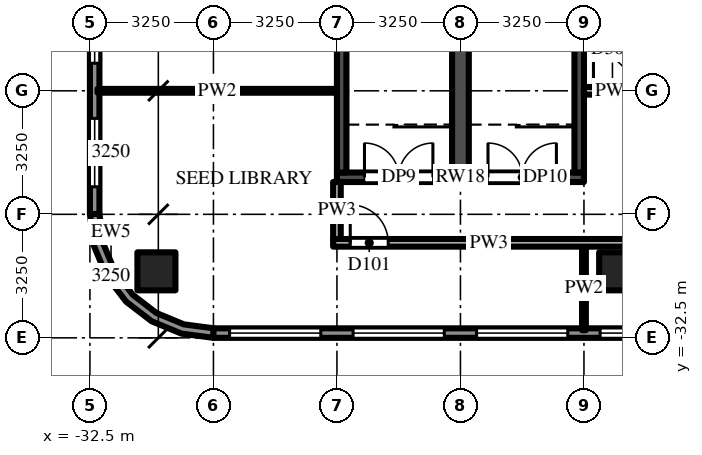
"""IFC4 building model, lengths in metres.
Left out: names, types, materials, properties, quantities, classifications, styles, units other than length and angle.
Written with IfcOpenShell. Run it as: python <this file> out.ifc"""

import sys

from ifc_helpers import new_model, si_unit, direction, frame, frame_2d, origin, origin_2d, place, context, subcontext, project, spatial, polyline, rectangle, outline, extrude, source, transform, mapped, element, fill, save


model = new_model("IFC4")
c1 = context("Model", 3, precision=1e-05, world=origin(), true_north=direction((0.0, 1.0)))
c2 = subcontext(c1, "Body", "Model", "MODEL_VIEW")
j1 = project(units=[si_unit("LENGTHUNIT", "METRE"), si_unit("PLANEANGLEUNIT", "RADIAN")], contexts=[c1])
p1 = place(None, origin())
s1 = spatial("IfcSite", under=j1, at=p1, CompositionType="ELEMENT")
p2 = place(p1, origin())
s2 = spatial("IfcBuilding", under=s1, at=p2, CompositionType="ELEMENT")
p3 = place(p2, frame((0.0, 0.0, 29.0)))
s3 = spatial("IfcBuildingStorey", under=s2, at=p3, CompositionType="ELEMENT", Elevation=29.0)
m1 = source(origin(), c2, "Body", "SweptSolid", [
    extrude(rectangle(XDim=1.0, YDim=1.0, at=origin_2d()), origin(), (0.0, 0.0, 1.0), 5.0),
])
for number, where, z_axis, x_axis in (
    (1, (-18.6, -30.75, 0.0), (0.0, 0.0, 1.0), (1.0, 0.0, 0.0)),
    (2, (-30.75, -30.75, 0.0), (0.0, 0.0, 1.0), (1.0, 0.0, 0.0)),
):
    element("IfcColumn", number, at=place(p3, frame(where, z_axis=z_axis, x_axis=x_axis)), inside=s3, PredefinedType="COLUMN", context=c2, shape_type="MappedRepresentation", body=[
        mapped(m1, transform((0.0, 0.0, 0.0))),
    ])
m2 = source(origin(), c2, "Body", "SweptSolid", [
    extrude(rectangle(XDim=6.5, YDim=0.25, at=frame_2d((3.25, 0.0))), origin(), (0.0, 0.0, 1.0), 4.65),
])
p4 = place(p3, frame((-26.0, -28.275, 0.0), z_axis=(0.0, 0.0, 1.0), x_axis=(1.0, 0.0, 0.0)))
e3 = element("IfcWall", 3, at=p4, inside=s3, PredefinedType="SHEAR", context=c2, shape_type="MappedRepresentation", body=[
    mapped(m2, transform((0.0, 0.0, 0.0))),
])
m3 = source(origin(), c2, "Body", "SweptSolid", [
    extrude(rectangle(XDim=1.8, YDim=2.1, at=frame_2d((0.9, 1.05))), frame((0.0, 0.135, 0.0), z_axis=(0.0, -1.0, 0.0), x_axis=(1.0, 0.0, 0.0)), (0.0, 0.0, 1.0), 0.27),
])
p5 = place(p4, frame((0.725, 0.0, 0.0)))
e4 = element("IfcOpeningElement", 4, at=p5, cuts=e3, PredefinedType="OPENING", context=c2, shape_type="MappedRepresentation", body=[
    mapped(m3, transform((0.0, 0.0, 0.0))),
])
p6 = place(p4, frame((3.975, 0.0, 0.0)))
e5 = element("IfcOpeningElement", 5, at=p6, cuts=e3, PredefinedType="OPENING", context=c2, shape_type="MappedRepresentation", body=[
    mapped(m3, transform((0.0, 0.0, 0.0))),
])
m4 = source(origin(), c2, "Body", "SweptSolid", [
    extrude(rectangle(XDim=8.3, YDim=0.25, at=frame_2d((4.15, 0.0))), origin(), (0.0, 0.0, 1.0), 4.65),
])
for number, where, z_axis, x_axis in (
    (6, (-25.875, -28.15, 0.0), (0.0, 0.0, 1.0), (0.0, 1.0, 0.0)),
    (7, (-19.625, -28.15, 0.0), (0.0, 0.0, 1.0), (0.0, 1.0, 0.0)),
):
    element("IfcWall", number, at=place(p3, frame(where, z_axis=z_axis, x_axis=x_axis)), inside=s3, PredefinedType="SHEAR", context=c2, shape_type="MappedRepresentation", body=[
        mapped(m4, transform((0.0, 0.0, 0.0))),
    ])
m5 = source(origin(), c2, "Body", "SweptSolid", [
    extrude(rectangle(XDim=8.3, YDim=0.44, at=frame_2d((4.15, 0.0))), origin(), (0.0, 0.0, 1.0), 4.65),
])
p7 = place(p3, frame((-22.75, -28.15, 0.0), z_axis=(0.0, 0.0, 1.0), x_axis=(0.0, 1.0, 0.0)))
e8 = element("IfcWall", 8, at=p7, inside=s3, PredefinedType="SHEAR", context=c2, shape_type="MappedRepresentation", body=[
    mapped(m5, transform((0.0, 0.0, 0.0))),
])
m6 = source(origin(), c2, "Body", "SweptSolid", [
    extrude(rectangle(XDim=58.5, YDim=0.25, at=frame_2d((29.25, 0.0))), origin(), (0.0, 0.0, 1.0), 4.65),
])
p8 = place(p3, frame((-32.375, 29.25, 0.0), z_axis=(0.0, 0.0, 1.0), x_axis=(0.0, -1.0, 0.0)))
e9 = element("IfcWall", 9, at=p8, inside=s3, PredefinedType="SOLIDWALL", context=c2, shape_type="MappedRepresentation", body=[
    mapped(m6, transform((0.0, 0.0, 0.0))),
])
m7 = source(origin(), c2, "Body", "SweptSolid", [
    extrude(rectangle(XDim=1.8, YDim=3.3, at=frame_2d((0.9, 1.65))), frame((0.0, 0.135, 0.0), z_axis=(0.0, -1.0, 0.0), x_axis=(1.0, 0.0, 0.0)), (0.0, 0.0, 1.0), 0.27),
])
p9 = place(p8, frame((0.725, 0.0, 0.6)))
e10 = element("IfcOpeningElement", 10, at=p9, cuts=e9, PredefinedType="OPENING", context=c2, shape_type="MappedRepresentation", body=[
    mapped(m7, transform((0.0, 0.0, 0.0))),
])
p10 = place(p8, frame((3.975, 0.0, 0.6)))
e11 = element("IfcOpeningElement", 11, at=p10, cuts=e9, PredefinedType="OPENING", context=c2, shape_type="MappedRepresentation", body=[
    mapped(m7, transform((0.0, 0.0, 0.0))),
])
p11 = place(p8, frame((7.225, 0.0, 0.6)))
e12 = element("IfcOpeningElement", 12, at=p11, cuts=e9, PredefinedType="OPENING", context=c2, shape_type="MappedRepresentation", body=[
    mapped(m7, transform((0.0, 0.0, 0.0))),
])
p12 = place(p8, frame((10.475, 0.0, 0.6)))
e13 = element("IfcOpeningElement", 13, at=p12, cuts=e9, PredefinedType="OPENING", context=c2, shape_type="MappedRepresentation", body=[
    mapped(m7, transform((0.0, 0.0, 0.0))),
])
p13 = place(p8, frame((13.725, 0.0, 0.6)))
e14 = element("IfcOpeningElement", 14, at=p13, cuts=e9, PredefinedType="OPENING", context=c2, shape_type="MappedRepresentation", body=[
    mapped(m7, transform((0.0, 0.0, 0.0))),
])
p14 = place(p8, frame((16.975, 0.0, 0.6)))
e15 = element("IfcOpeningElement", 15, at=p14, cuts=e9, PredefinedType="OPENING", context=c2, shape_type="MappedRepresentation", body=[
    mapped(m7, transform((0.0, 0.0, 0.0))),
])
p15 = place(p8, frame((20.225, 0.0, 0.6)))
e16 = element("IfcOpeningElement", 16, at=p15, cuts=e9, PredefinedType="OPENING", context=c2, shape_type="MappedRepresentation", body=[
    mapped(m7, transform((0.0, 0.0, 0.0))),
])
p16 = place(p8, frame((23.475, 0.0, 0.6)))
e17 = element("IfcOpeningElement", 17, at=p16, cuts=e9, PredefinedType="OPENING", context=c2, shape_type="MappedRepresentation", body=[
    mapped(m7, transform((0.0, 0.0, 0.0))),
])
p17 = place(p8, frame((26.725, 0.0, 0.6)))
e18 = element("IfcOpeningElement", 18, at=p17, cuts=e9, PredefinedType="OPENING", context=c2, shape_type="MappedRepresentation", body=[
    mapped(m7, transform((0.0, 0.0, 0.0))),
])
p18 = place(p8, frame((29.975, 0.0, 0.6)))
e19 = element("IfcOpeningElement", 19, at=p18, cuts=e9, PredefinedType="OPENING", context=c2, shape_type="MappedRepresentation", body=[
    mapped(m7, transform((0.0, 0.0, 0.0))),
])
p19 = place(p8, frame((33.225, 0.0, 0.6)))
e20 = element("IfcOpeningElement", 20, at=p19, cuts=e9, PredefinedType="OPENING", context=c2, shape_type="MappedRepresentation", body=[
    mapped(m7, transform((0.0, 0.0, 0.0))),
])
p20 = place(p8, frame((36.475, 0.0, 0.6)))
e21 = element("IfcOpeningElement", 21, at=p20, cuts=e9, PredefinedType="OPENING", context=c2, shape_type="MappedRepresentation", body=[
    mapped(m7, transform((0.0, 0.0, 0.0))),
])
p21 = place(p8, frame((39.725, 0.0, 0.6)))
e22 = element("IfcOpeningElement", 22, at=p21, cuts=e9, PredefinedType="OPENING", context=c2, shape_type="MappedRepresentation", body=[
    mapped(m7, transform((0.0, 0.0, 0.0))),
])
p22 = place(p8, frame((42.975, 0.0, 0.6)))
e23 = element("IfcOpeningElement", 23, at=p22, cuts=e9, PredefinedType="OPENING", context=c2, shape_type="MappedRepresentation", body=[
    mapped(m7, transform((0.0, 0.0, 0.0))),
])
p23 = place(p8, frame((46.225, 0.0, 0.6)))
e24 = element("IfcOpeningElement", 24, at=p23, cuts=e9, PredefinedType="OPENING", context=c2, shape_type="MappedRepresentation", body=[
    mapped(m7, transform((0.0, 0.0, 0.0))),
])
p24 = place(p8, frame((49.475, 0.0, 0.6)))
e25 = element("IfcOpeningElement", 25, at=p24, cuts=e9, PredefinedType="OPENING", context=c2, shape_type="MappedRepresentation", body=[
    mapped(m7, transform((0.0, 0.0, 0.0))),
])
p25 = place(p8, frame((52.725, 0.0, 0.6)))
e26 = element("IfcOpeningElement", 26, at=p25, cuts=e9, PredefinedType="OPENING", context=c2, shape_type="MappedRepresentation", body=[
    mapped(m7, transform((0.0, 0.0, 0.0))),
])
p26 = place(p8, frame((55.975, 0.0, 0.6)))
e27 = element("IfcOpeningElement", 27, at=p26, cuts=e9, PredefinedType="OPENING", context=c2, shape_type="MappedRepresentation", body=[
    mapped(m7, transform((0.0, 0.0, 0.0))),
])
p27 = place(p3, origin())
e28 = element("IfcWall", 28, at=p27, inside=s3, PredefinedType="SOLIDWALL", context=c2, shape_type="SweptSolid", body=[
    extrude(outline(polyline([(-32.5, -29.25), (-32.389, -30.091), (-32.065, -30.875), (-31.548, -31.548), (-30.875, -32.065), (-30.091, -32.389), (-29.25, -32.5), (-29.234, -32.25), (-30.026, -32.146), (-30.749, -31.846), (-31.37, -31.37), (-31.846, -30.749), (-32.146, -30.026), (-32.25, -29.234), (-32.5, -29.25)])), origin(), (0.0, 0.0, 1.0), 4.65),
])
p28 = place(p3, frame((-29.25, -32.375, 0.0), z_axis=(0.0, 0.0, 1.0), x_axis=(1.0, 0.0, 0.0)))
e29 = element("IfcWall", 29, at=p28, inside=s3, PredefinedType="SOLIDWALL", context=c2, shape_type="MappedRepresentation", body=[
    mapped(m6, transform((0.0, 0.0, 0.0))),
])
m8 = source(origin(), c2, "Body", "SweptSolid", [
    extrude(rectangle(XDim=2.4, YDim=3.3, at=frame_2d((1.2, 1.65))), frame((0.0, 0.135, 0.0), z_axis=(0.0, -1.0, 0.0), x_axis=(1.0, 0.0, 0.0)), (0.0, 0.0, 1.0), 0.27),
])
p29 = place(p28, frame((0.425, 0.0, 0.6)))
e30 = element("IfcOpeningElement", 30, at=p29, cuts=e29, PredefinedType="OPENING", context=c2, shape_type="MappedRepresentation", body=[
    mapped(m8, transform((0.0, 0.0, 0.0))),
])
p30 = place(p28, frame((3.675, 0.0, 0.6)))
e31 = element("IfcOpeningElement", 31, at=p30, cuts=e29, PredefinedType="OPENING", context=c2, shape_type="MappedRepresentation", body=[
    mapped(m8, transform((0.0, 0.0, 0.0))),
])
p31 = place(p28, frame((6.925, 0.0, 0.6)))
e32 = element("IfcOpeningElement", 32, at=p31, cuts=e29, PredefinedType="OPENING", context=c2, shape_type="MappedRepresentation", body=[
    mapped(m8, transform((0.0, 0.0, 0.0))),
])
p32 = place(p28, frame((10.175, 0.0, 0.6)))
e33 = element("IfcOpeningElement", 33, at=p32, cuts=e29, PredefinedType="OPENING", context=c2, shape_type="MappedRepresentation", body=[
    mapped(m8, transform((0.0, 0.0, 0.0))),
])
p33 = place(p28, frame((13.425, 0.0, 0.6)))
e34 = element("IfcOpeningElement", 34, at=p33, cuts=e29, PredefinedType="OPENING", context=c2, shape_type="MappedRepresentation", body=[
    mapped(m8, transform((0.0, 0.0, 0.0))),
])
p34 = place(p28, frame((16.675, 0.0, 0.6)))
e35 = element("IfcOpeningElement", 35, at=p34, cuts=e29, PredefinedType="OPENING", context=c2, shape_type="MappedRepresentation", body=[
    mapped(m8, transform((0.0, 0.0, 0.0))),
])
p35 = place(p28, frame((19.925, 0.0, 0.6)))
e36 = element("IfcOpeningElement", 36, at=p35, cuts=e29, PredefinedType="OPENING", context=c2, shape_type="MappedRepresentation", body=[
    mapped(m8, transform((0.0, 0.0, 0.0))),
])
p36 = place(p28, frame((23.175, 0.0, 0.6)))
e37 = element("IfcOpeningElement", 37, at=p36, cuts=e29, PredefinedType="OPENING", context=c2, shape_type="MappedRepresentation", body=[
    mapped(m8, transform((0.0, 0.0, 0.0))),
])
p37 = place(p28, frame((26.425, 0.0, 0.6)))
e38 = element("IfcOpeningElement", 38, at=p37, cuts=e29, PredefinedType="OPENING", context=c2, shape_type="MappedRepresentation", body=[
    mapped(m8, transform((0.0, 0.0, 0.0))),
])
p38 = place(p28, frame((29.675, 0.0, 0.6)))
e39 = element("IfcOpeningElement", 39, at=p38, cuts=e29, PredefinedType="OPENING", context=c2, shape_type="MappedRepresentation", body=[
    mapped(m8, transform((0.0, 0.0, 0.0))),
])
p39 = place(p28, frame((32.925, 0.0, 0.6)))
e40 = element("IfcOpeningElement", 40, at=p39, cuts=e29, PredefinedType="OPENING", context=c2, shape_type="MappedRepresentation", body=[
    mapped(m8, transform((0.0, 0.0, 0.0))),
])
p40 = place(p28, frame((36.175, 0.0, 0.6)))
e41 = element("IfcOpeningElement", 41, at=p40, cuts=e29, PredefinedType="OPENING", context=c2, shape_type="MappedRepresentation", body=[
    mapped(m8, transform((0.0, 0.0, 0.0))),
])
p41 = place(p28, frame((39.425, 0.0, 0.6)))
e42 = element("IfcOpeningElement", 42, at=p41, cuts=e29, PredefinedType="OPENING", context=c2, shape_type="MappedRepresentation", body=[
    mapped(m8, transform((0.0, 0.0, 0.0))),
])
p42 = place(p28, frame((42.675, 0.0, 0.6)))
e43 = element("IfcOpeningElement", 43, at=p42, cuts=e29, PredefinedType="OPENING", context=c2, shape_type="MappedRepresentation", body=[
    mapped(m8, transform((0.0, 0.0, 0.0))),
])
p43 = place(p28, frame((45.925, 0.0, 0.6)))
e44 = element("IfcOpeningElement", 44, at=p43, cuts=e29, PredefinedType="OPENING", context=c2, shape_type="MappedRepresentation", body=[
    mapped(m8, transform((0.0, 0.0, 0.0))),
])
p44 = place(p28, frame((49.175, 0.0, 0.6)))
e45 = element("IfcOpeningElement", 45, at=p44, cuts=e29, PredefinedType="OPENING", context=c2, shape_type="MappedRepresentation", body=[
    mapped(m8, transform((0.0, 0.0, 0.0))),
])
p45 = place(p28, frame((52.425, 0.0, 0.6)))
e46 = element("IfcOpeningElement", 46, at=p45, cuts=e29, PredefinedType="OPENING", context=c2, shape_type="MappedRepresentation", body=[
    mapped(m8, transform((0.0, 0.0, 0.0))),
])
p46 = place(p28, frame((55.675, 0.0, 0.6)))
e47 = element("IfcOpeningElement", 47, at=p46, cuts=e29, PredefinedType="OPENING", context=c2, shape_type="MappedRepresentation", body=[
    mapped(m8, transform((0.0, 0.0, 0.0))),
])
m9 = source(origin(), c2, "Body", "SweptSolid", [
    extrude(rectangle(XDim=1.5, YDim=0.2, at=frame_2d((0.75, 0.0))), origin(), (0.0, 0.0, 1.0), 4.65),
])
p47 = place(p3, frame((-26.0, -29.9, 0.0), z_axis=(0.0, 0.0, 1.0), x_axis=(0.0, 1.0, 0.0)))
e48 = element("IfcWall", 48, at=p47, inside=s3, PredefinedType="PARTITIONING", context=c2, shape_type="MappedRepresentation", body=[
    mapped(m9, transform((0.0, 0.0, 0.0))),
])
m10 = source(origin(), c2, "Body", "SweptSolid", [
    extrude(rectangle(XDim=2.2, YDim=0.1, at=frame_2d((1.1, 0.0))), origin(), (0.0, 0.0, 1.0), 3.73),
])
p48 = place(p3, frame((-19.5, -32.3, 0.0), z_axis=(0.0, 0.0, 1.0), x_axis=(0.0, 1.0, 0.0)))
e49 = element("IfcWall", 49, at=p48, inside=s3, PredefinedType="PARTITIONING", context=c2, shape_type="MappedRepresentation", body=[
    mapped(m10, transform((0.0, 0.0, 0.0))),
])
m11 = source(origin(), c2, "Body", "SweptSolid", [
    extrude(rectangle(XDim=8.2, YDim=0.2, at=frame_2d((4.1, 0.0))), origin(), (0.0, 0.0, 1.0), 3.712),
])
p49 = place(p3, frame((-26.1, -30.0, 0.0), z_axis=(0.0, 0.0, 1.0), x_axis=(1.0, 0.0, 0.0)))
e50 = element("IfcWall", 50, at=p49, inside=s3, PredefinedType="PARTITIONING", context=c2, shape_type="MappedRepresentation", body=[
    mapped(m11, transform((0.0, 0.0, 0.0))),
])
m12 = source(origin(), c2, "Body", "SweptSolid", [
    extrude(rectangle(XDim=1.0, YDim=2.1, at=frame_2d((0.5, 1.05))), frame((0.0, 0.11, 0.0), z_axis=(0.0, -1.0, 0.0), x_axis=(1.0, 0.0, 0.0)), (0.0, 0.0, 1.0), 0.22),
])
p50 = place(p49, frame((0.45, 0.0, 0.0)))
e51 = element("IfcOpeningElement", 51, at=p50, cuts=e50, PredefinedType="OPENING", context=c2, shape_type="MappedRepresentation", body=[
    mapped(m12, transform((0.0, 0.0, 0.0))),
])
m13 = source(origin(), c2, "Body", "SweptSolid", [
    extrude(rectangle(XDim=1.6, YDim=0.2, at=frame_2d((0.8, 0.0))), origin(), (0.0, 0.0, 1.0), 3.712),
])
p51 = place(p3, frame((-19.5, -26.0, 0.0), z_axis=(0.0, 0.0, 1.0), x_axis=(1.0, 0.0, 0.0)))
e52 = element("IfcWall", 52, at=p51, inside=s3, PredefinedType="PARTITIONING", context=c2, shape_type="MappedRepresentation", body=[
    mapped(m13, transform((0.0, 0.0, 0.0))),
])
p52 = place(p51, frame((0.25, 0.0, 0.0)))
e53 = element("IfcOpeningElement", 53, at=p52, cuts=e52, PredefinedType="OPENING", context=c2, shape_type="MappedRepresentation", body=[
    mapped(m12, transform((0.0, 0.0, 0.0))),
])
m14 = source(origin(), c2, "Body", "SweptSolid", [
    extrude(rectangle(XDim=6.3, YDim=0.1, at=frame_2d((3.15, 0.0))), origin(), (0.0, 0.0, 1.0), 3.73),
])
p53 = place(p3, frame((-32.3, -26.0, 0.0), z_axis=(0.0, 0.0, 1.0), x_axis=(1.0, 0.0, 0.0)))
e54 = element("IfcWall", 54, at=p53, inside=s3, PredefinedType="PARTITIONING", context=c2, shape_type="MappedRepresentation", body=[
    mapped(m14, transform((0.0, 0.0, 0.0))),
])
m15 = source(origin(), c2, "Body", "SweptSolid", [
    extrude(rectangle(XDim=1.8, YDim=2.1, at=frame_2d((0.9, 1.05))), frame((0.0, 0.025, 0.0), z_axis=(0.0, -1.0, 0.0), x_axis=(1.0, 0.0, 0.0)), (0.0, 0.0, 1.0), 0.05),
])
p54 = place(p5, origin())
e55 = element("IfcDoor", 55, at=p54, inside=s3, OperationType="DOUBLE_DOOR_SINGLE_SWING", PredefinedType="DOOR", context=c2, shape_type="MappedRepresentation", body=[
    mapped(m15, transform((0.0, 0.0, 0.0))),
])
fill(e4, e55)
p55 = place(p6, origin())
e56 = element("IfcDoor", 56, at=p55, inside=s3, OperationType="DOUBLE_DOOR_SINGLE_SWING", PredefinedType="DOOR", context=c2, shape_type="MappedRepresentation", body=[
    mapped(m15, transform((0.0, 0.0, 0.0))),
])
fill(e5, e56)
m16 = source(origin(), c2, "Body", "SweptSolid", [
    extrude(rectangle(XDim=1.8, YDim=3.3, at=frame_2d((0.9, 1.65))), frame((0.0, 0.03, 0.0), z_axis=(0.0, -1.0, 0.0), x_axis=(1.0, 0.0, 0.0)), (0.0, 0.0, 1.0), 0.06),
])
p56 = place(p25, origin())
e57 = element("IfcWindow", 57, at=p56, inside=s3, PartitioningType="SINGLE_PANEL", PredefinedType="WINDOW", context=c2, shape_type="MappedRepresentation", body=[
    mapped(m16, transform((0.0, 0.0, 0.0))),
])
fill(e26, e57)
p57 = place(p26, origin())
e58 = element("IfcWindow", 58, at=p57, inside=s3, PartitioningType="SINGLE_PANEL", PredefinedType="WINDOW", context=c2, shape_type="MappedRepresentation", body=[
    mapped(m16, transform((0.0, 0.0, 0.0))),
])
fill(e27, e58)
m17 = source(origin(), c2, "Body", "SweptSolid", [
    extrude(rectangle(XDim=2.4, YDim=3.3, at=frame_2d((1.2, 1.65))), frame((0.0, 0.03, 0.0), z_axis=(0.0, -1.0, 0.0), x_axis=(1.0, 0.0, 0.0)), (0.0, 0.0, 1.0), 0.06),
])
p58 = place(p29, origin())
e59 = element("IfcWindow", 59, at=p58, inside=s3, PartitioningType="SINGLE_PANEL", PredefinedType="WINDOW", context=c2, shape_type="MappedRepresentation", body=[
    mapped(m17, transform((0.0, 0.0, 0.0))),
])
fill(e30, e59)
p59 = place(p30, origin())
e60 = element("IfcWindow", 60, at=p59, inside=s3, PartitioningType="SINGLE_PANEL", PredefinedType="WINDOW", context=c2, shape_type="MappedRepresentation", body=[
    mapped(m17, transform((0.0, 0.0, 0.0))),
])
fill(e31, e60)
p60 = place(p31, origin())
e61 = element("IfcWindow", 61, at=p60, inside=s3, PartitioningType="SINGLE_PANEL", PredefinedType="WINDOW", context=c2, shape_type="MappedRepresentation", body=[
    mapped(m17, transform((0.0, 0.0, 0.0))),
])
fill(e32, e61)
p61 = place(p32, origin())
e62 = element("IfcWindow", 62, at=p61, inside=s3, PartitioningType="SINGLE_PANEL", PredefinedType="WINDOW", context=c2, shape_type="MappedRepresentation", body=[
    mapped(m17, transform((0.0, 0.0, 0.0))),
])
fill(e33, e62)
m18 = source(origin(), c2, "Body", "SweptSolid", [
    extrude(rectangle(XDim=1.0, YDim=2.1, at=frame_2d((0.5, 1.05))), frame((0.0, 0.025, 0.0), z_axis=(0.0, -1.0, 0.0), x_axis=(1.0, 0.0, 0.0)), (0.0, 0.0, 1.0), 0.05),
])
p62 = place(p50, origin())
e63 = element("IfcDoor", 63, at=p62, inside=s3, OperationType="SINGLE_SWING_LEFT", PredefinedType="DOOR", context=c2, shape_type="MappedRepresentation", body=[
    mapped(m18, transform((0.0, 0.0, 0.0))),
])
fill(e51, e63)
p63 = place(p52, origin())
e64 = element("IfcDoor", 64, at=p63, inside=s3, OperationType="SINGLE_SWING_LEFT", PredefinedType="DOOR", context=c2, shape_type="MappedRepresentation", body=[
    mapped(m18, transform((0.0, 0.0, 0.0))),
])
fill(e53, e64)
save(model, sys.argv[1])
